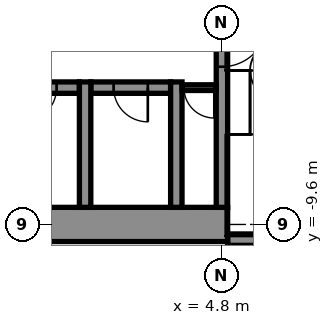
"""IFC4 building model, lengths in metres.
Left out: names, types, materials, properties, quantities, classifications, styles, units other than length and angle.
Written with IfcOpenShell. Run it as: python <this file> out.ifc"""

import sys

from ifc_helpers import new_model, si_unit, direction, frame, frame_2d, origin, place, context, subcontext, project, spatial, rectangle, extrude, element, fill, save


model = new_model("IFC4")
c1 = context("Model", 3, precision=1e-05, world=origin(), true_north=direction((0.0, 1.0)))
c2 = subcontext(c1, "Body", "Model", "MODEL_VIEW")
j1 = project(units=[si_unit("LENGTHUNIT", "METRE"), si_unit("PLANEANGLEUNIT", "RADIAN")], contexts=[c1])
p1 = place(None, origin())
s1 = spatial("IfcSite", under=j1, at=p1, CompositionType="ELEMENT")
p2 = place(p1, origin())
s2 = spatial("IfcBuilding", under=s1, at=p2, CompositionType="ELEMENT")
p3 = place(p2, frame((0.0, 0.0, 77.9)))
s3 = spatial("IfcBuildingStorey", under=s2, at=p3, CompositionType="ELEMENT", Elevation=77.9)
p4 = place(p3, frame((4.95, -10.0, -0.2), z_axis=(0.0, 0.0, 1.0), x_axis=(1.0, 0.0, 0.0)))
e1 = element("IfcWall", 1, at=p4, inside=s3, PredefinedType="STANDARD", context=c2, shape_type="SweptSolid", body=[
    extrude(rectangle(XDim=4.2, YDim=0.3, at=frame_2d((2.1, 0.0))), origin(), (0.0, 0.0, 1.0), 4.5),
])
p5 = place(p3, frame((-5.25, -9.6, -0.2), z_axis=(0.0, 0.0, 1.0), x_axis=(1.0, 0.0, 0.0)))
e2 = element("IfcWall", 2, at=p5, inside=s3, PredefinedType="SHEAR", context=c2, shape_type="SweptSolid", body=[
    extrude(rectangle(XDim=10.2, YDim=0.9, at=frame_2d((5.1, 0.0))), origin(), (0.0, 0.0, 1.0), 4.5),
])
p6 = place(p5, frame((0.6, 0.0, 0.2)))
e3 = element("IfcOpeningElement", 3, at=p6, cuts=e2, PredefinedType="OPENING", context=c2, shape_type="SweptSolid", body=[
    extrude(rectangle(XDim=0.9, YDim=2.1, at=frame_2d((0.45, 1.05))), frame((0.0, 0.46, 0.0), z_axis=(0.0, -1.0, 0.0), x_axis=(1.0, 0.0, 0.0)), (0.0, 0.0, 1.0), 0.92),
])
p7 = place(p3, frame((-1.05, -6.0, -0.2), z_axis=(0.0, 0.0, 1.0), x_axis=(1.0, 0.0, 0.0)))
e4 = element("IfcWall", 4, at=p7, inside=s3, PredefinedType="STANDARD", context=c2, shape_type="SweptSolid", body=[
    extrude(rectangle(XDim=2.1, YDim=0.3, at=frame_2d((1.05, 0.0))), origin(), (0.0, 0.0, 1.0), 4.5),
])
p8 = place(p7, frame((0.6, 0.0, 0.2)))
e5 = element("IfcOpeningElement", 5, at=p8, cuts=e4, PredefinedType="OPENING", context=c2, shape_type="SweptSolid", body=[
    extrude(rectangle(XDim=0.9, YDim=2.1, at=frame_2d((0.45, 1.05))), frame((0.0, 0.16, 0.0), z_axis=(0.0, -1.0, 0.0), x_axis=(1.0, 0.0, 0.0)), (0.0, 0.0, 1.0), 0.32),
])
p9 = place(p3, frame((1.35, -6.0, -0.2), z_axis=(0.0, 0.0, 1.0), x_axis=(1.0, 0.0, 0.0)))
e6 = element("IfcWall", 6, at=p9, inside=s3, PredefinedType="STANDARD", context=c2, shape_type="SweptSolid", body=[
    extrude(rectangle(XDim=2.1, YDim=0.3, at=frame_2d((1.05, 0.0))), origin(), (0.0, 0.0, 1.0), 4.5),
])
p10 = place(p9, frame((0.6, 0.0, 0.2)))
e7 = element("IfcOpeningElement", 7, at=p10, cuts=e6, PredefinedType="OPENING", context=c2, shape_type="SweptSolid", body=[
    extrude(rectangle(XDim=0.9, YDim=2.1, at=frame_2d((0.45, 1.05))), frame((0.0, 0.16, 0.0), z_axis=(0.0, -1.0, 0.0), x_axis=(1.0, 0.0, 0.0)), (0.0, 0.0, 1.0), 0.32),
])
for number, where, z_axis, x_axis in (
    (8, (1.2, -9.15, -0.2), (0.0, 0.0, 1.0), (0.0, 1.0, 0.0)),
    (9, (3.6, -9.15, -0.2), (0.0, 0.0, 1.0), (0.0, 1.0, 0.0)),
):
    element("IfcWall", number, at=place(p3, frame(where, z_axis=z_axis, x_axis=x_axis)), inside=s3, PredefinedType="STANDARD", context=c2, shape_type="SweptSolid", body=[
        extrude(rectangle(XDim=3.3, YDim=0.3, at=frame_2d((1.65, 0.0))), origin(), (0.0, 0.0, 1.0), 4.5),
    ])
p11 = place(p3, frame((4.8, -9.15, -0.2), z_axis=(0.0, 0.0, 1.0), x_axis=(0.0, 1.0, 0.0)))
e10 = element("IfcWall", 10, at=p11, inside=s3, PredefinedType="STANDARD", context=c2, shape_type="SweptSolid", body=[
    extrude(rectangle(XDim=6.9, YDim=0.3, at=frame_2d((3.45, 0.0))), origin(), (0.0, 0.0, 1.0), 4.5),
])
p12 = place(p11, frame((3.7, 0.0, 0.2)))
e11 = element("IfcOpeningElement", 11, at=p12, cuts=e10, PredefinedType="OPENING", context=c2, shape_type="SweptSolid", body=[
    extrude(rectangle(XDim=1.2, YDim=2.1, at=frame_2d((0.6, 1.05))), frame((0.0, 0.16, 0.0), z_axis=(0.0, -1.0, 0.0), x_axis=(1.0, 0.0, 0.0)), (0.0, 0.0, 1.0), 0.32),
])
p13 = place(p3, frame((3.75, -6.0, 0.0), z_axis=(0.0, 0.0, 1.0), x_axis=(1.0, 0.0, 0.0)))
e12 = element("IfcWall", 12, at=p13, inside=s3, PredefinedType="PARTITIONING", context=c2, shape_type="SweptSolid", body=[
    extrude(rectangle(XDim=0.9, YDim=0.15, at=frame_2d((0.45, 0.0))), origin(), (0.0, 0.0, 1.0), 4.3),
])
p14 = place(p13, frame((0.05, 0.0, 0.0)))
e13 = element("IfcOpeningElement", 13, at=p14, cuts=e12, PredefinedType="OPENING", context=c2, shape_type="SweptSolid", body=[
    extrude(rectangle(XDim=0.8, YDim=2.1, at=frame_2d((0.4, 1.05))), frame((0.0, 0.085, 0.0), z_axis=(0.0, -1.0, 0.0), x_axis=(1.0, 0.0, 0.0)), (0.0, 0.0, 1.0), 0.17),
])
p15 = place(p14, frame((0.8, 0.0, 0.0), z_axis=(0.0, 0.0, 1.0), x_axis=(-1.0, 0.0, 0.0)))
e14 = element("IfcDoor", 14, at=p15, inside=s3, OperationType="SINGLE_SWING_RIGHT", PredefinedType="DOOR", context=c2, shape_type="SweptSolid", body=[
    extrude(rectangle(XDim=0.8, YDim=2.1, at=frame_2d((0.4, 1.05))), frame((0.0, 0.025, 0.0), z_axis=(0.0, -1.0, 0.0), x_axis=(1.0, 0.0, 0.0)), (0.0, 0.0, 1.0), 0.05),
])
fill(e13, e14)
p16 = place(p12, frame((1.2, 0.0, 0.0), z_axis=(0.0, 0.0, 1.0), x_axis=(-1.0, 0.0, 0.0)))
e15 = element("IfcDoor", 15, at=p16, inside=s3, OperationType="SINGLE_SWING_RIGHT", PredefinedType="DOOR", context=c2, shape_type="SweptSolid", body=[
    extrude(rectangle(XDim=1.2, YDim=2.1, at=frame_2d((0.6, 1.05))), frame((0.0, 0.025, 0.0), z_axis=(0.0, -1.0, 0.0), x_axis=(1.0, 0.0, 0.0)), (0.0, 0.0, 1.0), 0.05),
])
fill(e11, e15)
p17 = place(p8, frame((0.9, 0.0, 0.0), z_axis=(0.0, 0.0, 1.0), x_axis=(-1.0, 0.0, 0.0)))
e16 = element("IfcDoor", 16, at=p17, inside=s3, OperationType="SINGLE_SWING_LEFT", PredefinedType="DOOR", context=c2, shape_type="SweptSolid", body=[
    extrude(rectangle(XDim=0.9, YDim=2.1, at=frame_2d((0.45, 1.05))), frame((0.0, 0.025, 0.0), z_axis=(0.0, -1.0, 0.0), x_axis=(1.0, 0.0, 0.0)), (0.0, 0.0, 1.0), 0.05),
])
fill(e5, e16)
p18 = place(p10, frame((0.9, 0.0, 0.0), z_axis=(0.0, 0.0, 1.0), x_axis=(-1.0, 0.0, 0.0)))
e17 = element("IfcDoor", 17, at=p18, inside=s3, OperationType="SINGLE_SWING_RIGHT", PredefinedType="DOOR", context=c2, shape_type="SweptSolid", body=[
    extrude(rectangle(XDim=0.9, YDim=2.1, at=frame_2d((0.45, 1.05))), frame((0.0, 0.025, 0.0), z_axis=(0.0, -1.0, 0.0), x_axis=(1.0, 0.0, 0.0)), (0.0, 0.0, 1.0), 0.05),
])
fill(e7, e17)
save(model, sys.argv[1])
